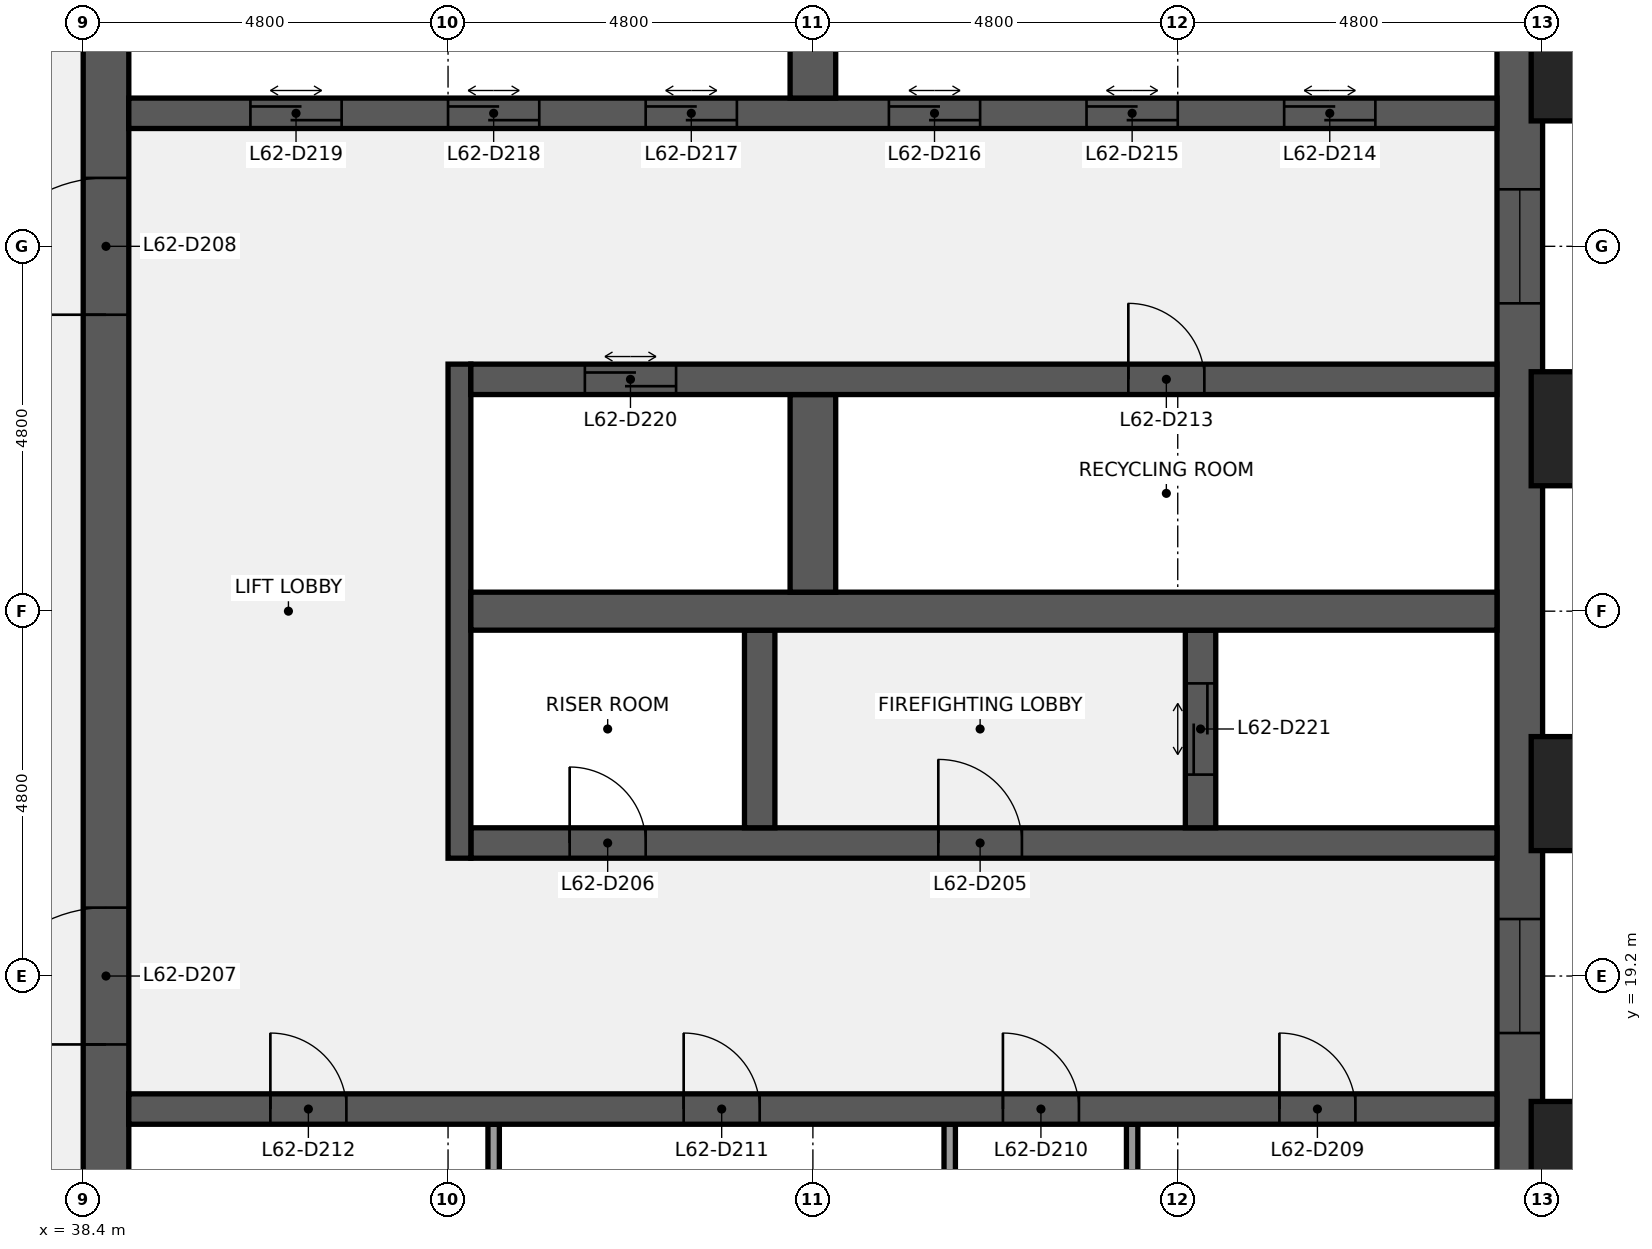
"""IFC4 building model, lengths in metres.
Left out: names, types, materials, properties, quantities, classifications, styles, units other than length and angle.
Written with IfcOpenShell. Run it as: python <this file> out.ifc"""

import sys

from ifc_helpers import new_model, si_unit, direction, frame, frame_2d, origin, origin_2d, place, context, subcontext, project, spatial, rectangle, extrude, element, fill, save


model = new_model("IFC4")
c1 = context("Model", 3, precision=1e-05, world=origin(), true_north=direction((0.0, 1.0)))
c2 = subcontext(c1, "Body", "Model", "MODEL_VIEW")
j1 = project(units=[si_unit("LENGTHUNIT", "METRE"), si_unit("PLANEANGLEUNIT", "RADIAN")], contexts=[c1])
p1 = place(None, origin())
s1 = spatial("IfcSite", under=j1, at=p1, CompositionType="ELEMENT")
p2 = place(p1, origin())
s2 = spatial("IfcBuilding", under=s1, at=p2, CompositionType="ELEMENT")
p3 = place(p2, frame((0.0, 0.0, 286.3)))
s3 = spatial("IfcBuildingStorey", under=s2, at=p3, CompositionType="ELEMENT", Elevation=286.3)
p4 = place(p3, frame((57.3, 38.4, 0.0), z_axis=(0.0, 0.0, 1.0), x_axis=(0.0, -1.0, 0.0)))
e1 = element("IfcWall", 1, at=p4, inside=s3, PredefinedType="SHEAR", context=c2, shape_type="SweptSolid", body=[
    extrude(rectangle(XDim=28.8, YDim=0.6, at=frame_2d((14.4, 0.0))), origin(), (0.0, 0.0, 1.0), 3.84),
])
p5 = place(p4, frame((18.45, 0.0, 0.9)))
e2 = element("IfcOpeningElement", 2, at=p5, cuts=e1, PredefinedType="OPENING", context=c2, shape_type="SweptSolid", body=[
    extrude(rectangle(XDim=1.5, YDim=1.5, at=frame_2d((0.75, 0.75))), frame((0.0, 0.31, 0.0), z_axis=(0.0, -1.0, 0.0), x_axis=(1.0, 0.0, 0.0)), (0.0, 0.0, 1.0), 0.62),
])
p6 = place(p4, frame((8.85, 0.0, 0.9)))
e3 = element("IfcOpeningElement", 3, at=p6, cuts=e1, PredefinedType="OPENING", context=c2, shape_type="SweptSolid", body=[
    extrude(rectangle(XDim=1.5, YDim=1.5, at=frame_2d((0.75, 0.75))), frame((0.0, 0.31, 0.0), z_axis=(0.0, -1.0, 0.0), x_axis=(1.0, 0.0, 0.0)), (0.0, 0.0, 1.0), 0.62),
])
p7 = place(p3, frame((38.7, 9.6, 0.0), z_axis=(0.0, 0.0, 1.0), x_axis=(0.0, 1.0, 0.0)))
e4 = element("IfcWall", 4, at=p7, inside=s3, PredefinedType="SHEAR", context=c2, shape_type="SweptSolid", body=[
    extrude(rectangle(XDim=28.8, YDim=0.6, at=frame_2d((14.4, 0.0))), origin(), (0.0, 0.0, 1.0), 3.84),
])
p8 = place(p7, frame((8.7, 0.0, 0.0)))
e5 = element("IfcOpeningElement", 5, at=p8, cuts=e4, PredefinedType="OPENING", context=c2, shape_type="SweptSolid", body=[
    extrude(rectangle(XDim=1.8, YDim=2.1, at=frame_2d((0.9, 1.05))), frame((0.0, 0.31, 0.0), z_axis=(0.0, -1.0, 0.0), x_axis=(1.0, 0.0, 0.0)), (0.0, 0.0, 1.0), 0.62),
])
p9 = place(p7, frame((18.3, 0.0, 0.0)))
e6 = element("IfcOpeningElement", 6, at=p9, cuts=e4, PredefinedType="OPENING", context=c2, shape_type="SweptSolid", body=[
    extrude(rectangle(XDim=1.8, YDim=2.1, at=frame_2d((0.9, 1.05))), frame((0.0, 0.31, 0.0), z_axis=(0.0, -1.0, 0.0), x_axis=(1.0, 0.0, 0.0)), (0.0, 0.0, 1.0), 0.62),
])
for number, where, z_axis, x_axis in (
    (7, (52.2, 14.65, 0.0), (0.0, 0.0, 1.0), (0.0, 1.0, 0.0)),
    (8, (49.8, 14.65, 0.0), (0.0, 0.0, 1.0), (0.0, 1.0, 0.0)),
    (9, (43.8, 14.65, 0.0), (0.0, 0.0, 1.0), (0.0, 1.0, 0.0)),
):
    element("IfcWall", number, at=place(p3, frame(where, z_axis=z_axis, x_axis=x_axis)), inside=s3, PredefinedType="PARTITIONING", context=c2, shape_type="SweptSolid", body=[
        extrude(rectangle(XDim=2.6, YDim=0.15, at=frame_2d((1.3, 0.0))), origin(), (0.0, 0.0, 1.0), 3.84),
    ])
p10 = place(p3, frame((39.0, 17.45, 0.0), z_axis=(0.0, 0.0, 1.0), x_axis=(1.0, 0.0, 0.0)))
e10 = element("IfcWall", 10, at=p10, inside=s3, PredefinedType="SHEAR", context=c2, shape_type="SweptSolid", body=[
    extrude(rectangle(XDim=18.0, YDim=0.4, at=frame_2d((9.0, 0.0))), origin(), (0.0, 0.0, 1.0), 3.84),
])
p11 = place(p10, frame((15.137, 0.0, 0.0)))
e11 = element("IfcOpeningElement", 11, at=p11, cuts=e10, PredefinedType="OPENING", context=c2, shape_type="SweptSolid", body=[
    extrude(rectangle(XDim=1.0, YDim=2.1, at=frame_2d((0.5, 1.05))), frame((0.0, 0.21, 0.0), z_axis=(0.0, -1.0, 0.0), x_axis=(1.0, 0.0, 0.0)), (0.0, 0.0, 1.0), 0.42),
])
p12 = place(p10, frame((11.5, 0.0, 0.0)))
e12 = element("IfcOpeningElement", 12, at=p12, cuts=e10, PredefinedType="OPENING", context=c2, shape_type="SweptSolid", body=[
    extrude(rectangle(XDim=1.0, YDim=2.1, at=frame_2d((0.5, 1.05))), frame((0.0, 0.21, 0.0), z_axis=(0.0, -1.0, 0.0), x_axis=(1.0, 0.0, 0.0)), (0.0, 0.0, 1.0), 0.42),
])
p13 = place(p10, frame((7.3, 0.0, 0.0)))
e13 = element("IfcOpeningElement", 13, at=p13, cuts=e10, PredefinedType="OPENING", context=c2, shape_type="SweptSolid", body=[
    extrude(rectangle(XDim=1.0, YDim=2.1, at=frame_2d((0.5, 1.05))), frame((0.0, 0.21, 0.0), z_axis=(0.0, -1.0, 0.0), x_axis=(1.0, 0.0, 0.0)), (0.0, 0.0, 1.0), 0.42),
])
p14 = place(p10, frame((1.863, 0.0, 0.0)))
e14 = element("IfcOpeningElement", 14, at=p14, cuts=e10, PredefinedType="OPENING", context=c2, shape_type="SweptSolid", body=[
    extrude(rectangle(XDim=1.0, YDim=2.1, at=frame_2d((0.5, 1.05))), frame((0.0, 0.21, 0.0), z_axis=(0.0, -1.0, 0.0), x_axis=(1.0, 0.0, 0.0)), (0.0, 0.0, 1.0), 0.42),
])
p15 = place(p3, frame((43.5, 20.95, 0.0), z_axis=(0.0, 0.0, 1.0), x_axis=(1.0, 0.0, 0.0)))
e15 = element("IfcWall", 15, at=p15, inside=s3, PredefinedType="SHEAR", context=c2, shape_type="SweptSolid", body=[
    extrude(rectangle(XDim=13.5, YDim=0.4, at=frame_2d((6.75, 0.0))), origin(), (0.0, 0.0, 1.0), 3.84),
])
p16 = place(p15, frame((6.15, 0.0, 0.0)))
e16 = element("IfcOpeningElement", 16, at=p16, cuts=e15, PredefinedType="OPENING", context=c2, shape_type="SweptSolid", body=[
    extrude(rectangle(XDim=1.1, YDim=2.1, at=frame_2d((0.55, 1.05))), frame((0.0, 0.21, 0.0), z_axis=(0.0, -1.0, 0.0), x_axis=(1.0, 0.0, 0.0)), (0.0, 0.0, 1.0), 0.42),
])
p17 = place(p15, frame((1.3, 0.0, 0.0)))
e17 = element("IfcOpeningElement", 17, at=p17, cuts=e15, PredefinedType="OPENING", context=c2, shape_type="SweptSolid", body=[
    extrude(rectangle(XDim=1.0, YDim=2.1, at=frame_2d((0.5, 1.05))), frame((0.0, 0.21, 0.0), z_axis=(0.0, -1.0, 0.0), x_axis=(1.0, 0.0, 0.0)), (0.0, 0.0, 1.0), 0.42),
])
p18 = place(p3, frame((43.35, 20.75, 0.0), z_axis=(0.0, 0.0, 1.0), x_axis=(0.0, 1.0, 0.0)))
e18 = element("IfcWall", 18, at=p18, inside=s3, PredefinedType="SHEAR", context=c2, shape_type="SweptSolid", body=[
    extrude(rectangle(XDim=6.5, YDim=0.3, at=frame_2d((3.25, 0.0))), origin(), (0.0, 0.0, 1.0), 3.84),
])
p19 = place(p3, frame((53.1, 21.15, 0.0), z_axis=(0.0, 0.0, 1.0), x_axis=(0.0, 1.0, 0.0)))
e19 = element("IfcWall", 19, at=p19, inside=s3, PredefinedType="SHEAR", context=c2, shape_type="SweptSolid", body=[
    extrude(rectangle(XDim=2.6, YDim=0.4, at=frame_2d((1.3, 0.0))), origin(), (0.0, 0.0, 1.0), 3.84),
])
p20 = place(p19, frame((0.7, 0.0, 0.0)))
e20 = element("IfcOpeningElement", 20, at=p20, cuts=e19, PredefinedType="OPENING", context=c2, shape_type="SweptSolid", body=[
    extrude(rectangle(XDim=1.2, YDim=2.1, at=frame_2d((0.6, 1.05))), frame((0.0, 0.21, 0.0), z_axis=(0.0, -1.0, 0.0), x_axis=(1.0, 0.0, 0.0)), (0.0, 0.0, 1.0), 0.42),
])
p21 = place(p3, frame((47.3, 21.15, 0.0), z_axis=(0.0, 0.0, 1.0), x_axis=(0.0, 1.0, 0.0)))
e21 = element("IfcWall", 21, at=p21, inside=s3, PredefinedType="SHEAR", context=c2, shape_type="SweptSolid", body=[
    extrude(rectangle(XDim=2.6, YDim=0.4, at=frame_2d((1.3, 0.0))), origin(), (0.0, 0.0, 1.0), 3.84),
])
p22 = place(p3, frame((43.5, 24.0, 0.0), z_axis=(0.0, 0.0, 1.0), x_axis=(1.0, 0.0, 0.0)))
e22 = element("IfcWall", 22, at=p22, inside=s3, PredefinedType="SHEAR", context=c2, shape_type="SweptSolid", body=[
    extrude(rectangle(XDim=13.5, YDim=0.5, at=frame_2d((6.75, 0.0))), origin(), (0.0, 0.0, 1.0), 3.84),
])
p23 = place(p3, frame((48.0, 24.25, 0.0), z_axis=(0.0, 0.0, 1.0), x_axis=(0.0, 1.0, 0.0)))
e23 = element("IfcWall", 23, at=p23, inside=s3, PredefinedType="SHEAR", context=c2, shape_type="SweptSolid", body=[
    extrude(rectangle(XDim=2.6, YDim=0.6, at=frame_2d((1.3, 0.0))), origin(), (0.0, 0.0, 1.0), 3.84),
])
p24 = place(p3, frame((43.5, 27.05, 0.0), z_axis=(0.0, 0.0, 1.0), x_axis=(1.0, 0.0, 0.0)))
e24 = element("IfcWall", 24, at=p24, inside=s3, PredefinedType="SHEAR", context=c2, shape_type="SweptSolid", body=[
    extrude(rectangle(XDim=13.5, YDim=0.4, at=frame_2d((6.75, 0.0))), origin(), (0.0, 0.0, 1.0), 3.84),
])
p25 = place(p24, frame((8.65, 0.0, 0.0)))
e25 = element("IfcOpeningElement", 25, at=p25, cuts=e24, PredefinedType="OPENING", context=c2, shape_type="SweptSolid", body=[
    extrude(rectangle(XDim=1.0, YDim=2.1, at=frame_2d((0.5, 1.05))), frame((0.0, 0.21, 0.0), z_axis=(0.0, -1.0, 0.0), x_axis=(1.0, 0.0, 0.0)), (0.0, 0.0, 1.0), 0.42),
])
p26 = place(p24, frame((1.5, 0.0, 0.0)))
e26 = element("IfcOpeningElement", 26, at=p26, cuts=e24, PredefinedType="OPENING", context=c2, shape_type="SweptSolid", body=[
    extrude(rectangle(XDim=1.2, YDim=2.1, at=frame_2d((0.6, 1.05))), frame((0.0, 0.21, 0.0), z_axis=(0.0, -1.0, 0.0), x_axis=(1.0, 0.0, 0.0)), (0.0, 0.0, 1.0), 0.42),
])
p27 = place(p3, frame((39.0, 30.55, 0.0), z_axis=(0.0, 0.0, 1.0), x_axis=(1.0, 0.0, 0.0)))
e27 = element("IfcWall", 27, at=p27, inside=s3, PredefinedType="SHEAR", context=c2, shape_type="SweptSolid", body=[
    extrude(rectangle(XDim=18.0, YDim=0.4, at=frame_2d((9.0, 0.0))), origin(), (0.0, 0.0, 1.0), 3.84),
])
p28 = place(p27, frame((15.2, 0.0, 0.0)))
e28 = element("IfcOpeningElement", 28, at=p28, cuts=e27, PredefinedType="OPENING", context=c2, shape_type="SweptSolid", body=[
    extrude(rectangle(XDim=1.2, YDim=2.1, at=frame_2d((0.6, 1.05))), frame((0.0, 0.21, 0.0), z_axis=(0.0, -1.0, 0.0), x_axis=(1.0, 0.0, 0.0)), (0.0, 0.0, 1.0), 0.42),
])
p29 = place(p27, frame((12.6, 0.0, 0.0)))
e29 = element("IfcOpeningElement", 29, at=p29, cuts=e27, PredefinedType="OPENING", context=c2, shape_type="SweptSolid", body=[
    extrude(rectangle(XDim=1.2, YDim=2.1, at=frame_2d((0.6, 1.05))), frame((0.0, 0.21, 0.0), z_axis=(0.0, -1.0, 0.0), x_axis=(1.0, 0.0, 0.0)), (0.0, 0.0, 1.0), 0.42),
])
p30 = place(p27, frame((10.0, 0.0, 0.0)))
e30 = element("IfcOpeningElement", 30, at=p30, cuts=e27, PredefinedType="OPENING", context=c2, shape_type="SweptSolid", body=[
    extrude(rectangle(XDim=1.2, YDim=2.1, at=frame_2d((0.6, 1.05))), frame((0.0, 0.21, 0.0), z_axis=(0.0, -1.0, 0.0), x_axis=(1.0, 0.0, 0.0)), (0.0, 0.0, 1.0), 0.42),
])
p31 = place(p27, frame((6.8, 0.0, 0.0)))
e31 = element("IfcOpeningElement", 31, at=p31, cuts=e27, PredefinedType="OPENING", context=c2, shape_type="SweptSolid", body=[
    extrude(rectangle(XDim=1.2, YDim=2.1, at=frame_2d((0.6, 1.05))), frame((0.0, 0.21, 0.0), z_axis=(0.0, -1.0, 0.0), x_axis=(1.0, 0.0, 0.0)), (0.0, 0.0, 1.0), 0.42),
])
p32 = place(p27, frame((4.2, 0.0, 0.0)))
e32 = element("IfcOpeningElement", 32, at=p32, cuts=e27, PredefinedType="OPENING", context=c2, shape_type="SweptSolid", body=[
    extrude(rectangle(XDim=1.2, YDim=2.1, at=frame_2d((0.6, 1.05))), frame((0.0, 0.21, 0.0), z_axis=(0.0, -1.0, 0.0), x_axis=(1.0, 0.0, 0.0)), (0.0, 0.0, 1.0), 0.42),
])
p33 = place(p27, frame((1.6, 0.0, 0.0)))
e33 = element("IfcOpeningElement", 33, at=p33, cuts=e27, PredefinedType="OPENING", context=c2, shape_type="SweptSolid", body=[
    extrude(rectangle(XDim=1.2, YDim=2.1, at=frame_2d((0.6, 1.05))), frame((0.0, 0.21, 0.0), z_axis=(0.0, -1.0, 0.0), x_axis=(1.0, 0.0, 0.0)), (0.0, 0.0, 1.0), 0.42),
])
p34 = place(p3, frame((48.0, 30.75, 0.0), z_axis=(0.0, 0.0, 1.0), x_axis=(0.0, 1.0, 0.0)))
e34 = element("IfcWall", 34, at=p34, inside=s3, PredefinedType="SHEAR", context=c2, shape_type="SweptSolid", body=[
    extrude(rectangle(XDim=2.6, YDim=0.6, at=frame_2d((1.3, 0.0))), origin(), (0.0, 0.0, 1.0), 3.84),
])
for number, where, z_axis, x_axis in (
    (35, (58.35, 16.8, 0.0), (0.0, 0.0, 1.0), (0.0, 1.0, 0.0)),
    (36, (58.35, 21.6, 0.0), (0.0, 0.0, 1.0), (0.0, 1.0, 0.0)),
    (37, (58.35, 26.4, 0.0), (0.0, 0.0, 1.0), (0.0, 1.0, 0.0)),
    (38, (58.35, 31.2, 0.0), (0.0, 0.0, 1.0), (0.0, 1.0, 0.0)),
):
    element("IfcColumn", number, at=place(p3, frame(where, z_axis=z_axis, x_axis=x_axis)), inside=s3, PredefinedType="PILASTER", context=c2, shape_type="SweptSolid", body=[
        extrude(rectangle(XDim=1.8, YDim=1.5, at=origin_2d()), origin(), (0.0, 0.0, 1.0), 4.0),
    ])
p35 = place(p16, origin())
e39 = element("IfcDoor", 39, at=p35, inside=s3, OperationType="SINGLE_SWING_LEFT", PredefinedType="DOOR", context=c2, shape_type="SweptSolid", body=[
    extrude(rectangle(XDim=1.1, YDim=2.1, at=frame_2d((0.55, 1.05))), frame((0.0, 0.025, 0.0), z_axis=(0.0, -1.0, 0.0), x_axis=(1.0, 0.0, 0.0)), (0.0, 0.0, 1.0), 0.05),
])
fill(e16, e39)
p36 = place(p17, origin())
e40 = element("IfcDoor", 40, at=p36, inside=s3, OperationType="SINGLE_SWING_LEFT", PredefinedType="DOOR", context=c2, shape_type="SweptSolid", body=[
    extrude(rectangle(XDim=1.0, YDim=2.1, at=frame_2d((0.5, 1.05))), frame((0.0, 0.025, 0.0), z_axis=(0.0, -1.0, 0.0), x_axis=(1.0, 0.0, 0.0)), (0.0, 0.0, 1.0), 0.05),
])
fill(e17, e40)
p37 = place(p8, origin())
e41 = element("IfcDoor", 41, at=p37, inside=s3, OperationType="DOUBLE_DOOR_SINGLE_SWING", PredefinedType="DOOR", context=c2, shape_type="SweptSolid", body=[
    extrude(rectangle(XDim=1.8, YDim=2.1, at=frame_2d((0.9, 1.05))), frame((0.0, 0.025, 0.0), z_axis=(0.0, -1.0, 0.0), x_axis=(1.0, 0.0, 0.0)), (0.0, 0.0, 1.0), 0.05),
])
fill(e5, e41)
p38 = place(p9, origin())
e42 = element("IfcDoor", 42, at=p38, inside=s3, OperationType="DOUBLE_DOOR_SINGLE_SWING", PredefinedType="DOOR", context=c2, shape_type="SweptSolid", body=[
    extrude(rectangle(XDim=1.8, YDim=2.1, at=frame_2d((0.9, 1.05))), frame((0.0, 0.025, 0.0), z_axis=(0.0, -1.0, 0.0), x_axis=(1.0, 0.0, 0.0)), (0.0, 0.0, 1.0), 0.05),
])
fill(e6, e42)
p39 = place(p11, origin())
e43 = element("IfcDoor", 43, at=p39, inside=s3, OperationType="SINGLE_SWING_LEFT", PredefinedType="DOOR", context=c2, shape_type="SweptSolid", body=[
    extrude(rectangle(XDim=1.0, YDim=2.1, at=frame_2d((0.5, 1.05))), frame((0.0, 0.025, 0.0), z_axis=(0.0, -1.0, 0.0), x_axis=(1.0, 0.0, 0.0)), (0.0, 0.0, 1.0), 0.05),
])
fill(e11, e43)
p40 = place(p12, origin())
e44 = element("IfcDoor", 44, at=p40, inside=s3, OperationType="SINGLE_SWING_LEFT", PredefinedType="DOOR", context=c2, shape_type="SweptSolid", body=[
    extrude(rectangle(XDim=1.0, YDim=2.1, at=frame_2d((0.5, 1.05))), frame((0.0, 0.025, 0.0), z_axis=(0.0, -1.0, 0.0), x_axis=(1.0, 0.0, 0.0)), (0.0, 0.0, 1.0), 0.05),
])
fill(e12, e44)
p41 = place(p13, origin())
e45 = element("IfcDoor", 45, at=p41, inside=s3, OperationType="SINGLE_SWING_LEFT", PredefinedType="DOOR", context=c2, shape_type="SweptSolid", body=[
    extrude(rectangle(XDim=1.0, YDim=2.1, at=frame_2d((0.5, 1.05))), frame((0.0, 0.025, 0.0), z_axis=(0.0, -1.0, 0.0), x_axis=(1.0, 0.0, 0.0)), (0.0, 0.0, 1.0), 0.05),
])
fill(e13, e45)
p42 = place(p14, origin())
e46 = element("IfcDoor", 46, at=p42, inside=s3, OperationType="SINGLE_SWING_LEFT", PredefinedType="DOOR", context=c2, shape_type="SweptSolid", body=[
    extrude(rectangle(XDim=1.0, YDim=2.1, at=frame_2d((0.5, 1.05))), frame((0.0, 0.025, 0.0), z_axis=(0.0, -1.0, 0.0), x_axis=(1.0, 0.0, 0.0)), (0.0, 0.0, 1.0), 0.05),
])
fill(e14, e46)
p43 = place(p25, origin())
e47 = element("IfcDoor", 47, at=p43, inside=s3, OperationType="SINGLE_SWING_LEFT", PredefinedType="DOOR", context=c2, shape_type="SweptSolid", body=[
    extrude(rectangle(XDim=1.0, YDim=2.1, at=frame_2d((0.5, 1.05))), frame((0.0, 0.025, 0.0), z_axis=(0.0, -1.0, 0.0), x_axis=(1.0, 0.0, 0.0)), (0.0, 0.0, 1.0), 0.05),
])
fill(e25, e47)
p44 = place(p28, origin())
e48 = element("IfcDoor", 48, at=p44, inside=s3, OperationType="DOUBLE_DOOR_SLIDING", PredefinedType="DOOR", context=c2, shape_type="SweptSolid", body=[
    extrude(rectangle(XDim=1.2, YDim=2.1, at=frame_2d((0.6, 1.05))), frame((0.0, 0.025, 0.0), z_axis=(0.0, -1.0, 0.0), x_axis=(1.0, 0.0, 0.0)), (0.0, 0.0, 1.0), 0.05),
])
fill(e28, e48)
p45 = place(p29, origin())
e49 = element("IfcDoor", 49, at=p45, inside=s3, OperationType="DOUBLE_DOOR_SLIDING", PredefinedType="DOOR", context=c2, shape_type="SweptSolid", body=[
    extrude(rectangle(XDim=1.2, YDim=2.1, at=frame_2d((0.6, 1.05))), frame((0.0, 0.025, 0.0), z_axis=(0.0, -1.0, 0.0), x_axis=(1.0, 0.0, 0.0)), (0.0, 0.0, 1.0), 0.05),
])
fill(e29, e49)
p46 = place(p30, origin())
e50 = element("IfcDoor", 50, at=p46, inside=s3, OperationType="DOUBLE_DOOR_SLIDING", PredefinedType="DOOR", context=c2, shape_type="SweptSolid", body=[
    extrude(rectangle(XDim=1.2, YDim=2.1, at=frame_2d((0.6, 1.05))), frame((0.0, 0.025, 0.0), z_axis=(0.0, -1.0, 0.0), x_axis=(1.0, 0.0, 0.0)), (0.0, 0.0, 1.0), 0.05),
])
fill(e30, e50)
p47 = place(p31, origin())
e51 = element("IfcDoor", 51, at=p47, inside=s3, OperationType="DOUBLE_DOOR_SLIDING", PredefinedType="DOOR", context=c2, shape_type="SweptSolid", body=[
    extrude(rectangle(XDim=1.2, YDim=2.1, at=frame_2d((0.6, 1.05))), frame((0.0, 0.025, 0.0), z_axis=(0.0, -1.0, 0.0), x_axis=(1.0, 0.0, 0.0)), (0.0, 0.0, 1.0), 0.05),
])
fill(e31, e51)
p48 = place(p32, origin())
e52 = element("IfcDoor", 52, at=p48, inside=s3, OperationType="DOUBLE_DOOR_SLIDING", PredefinedType="DOOR", context=c2, shape_type="SweptSolid", body=[
    extrude(rectangle(XDim=1.2, YDim=2.1, at=frame_2d((0.6, 1.05))), frame((0.0, 0.025, 0.0), z_axis=(0.0, -1.0, 0.0), x_axis=(1.0, 0.0, 0.0)), (0.0, 0.0, 1.0), 0.05),
])
fill(e32, e52)
p49 = place(p33, origin())
e53 = element("IfcDoor", 53, at=p49, inside=s3, OperationType="DOUBLE_DOOR_SLIDING", PredefinedType="DOOR", context=c2, shape_type="SweptSolid", body=[
    extrude(rectangle(XDim=1.2, YDim=2.1, at=frame_2d((0.6, 1.05))), frame((0.0, 0.025, 0.0), z_axis=(0.0, -1.0, 0.0), x_axis=(1.0, 0.0, 0.0)), (0.0, 0.0, 1.0), 0.05),
])
fill(e33, e53)
p50 = place(p26, origin())
e54 = element("IfcDoor", 54, at=p50, inside=s3, OperationType="DOUBLE_DOOR_SLIDING", PredefinedType="DOOR", context=c2, shape_type="SweptSolid", body=[
    extrude(rectangle(XDim=1.2, YDim=2.1, at=frame_2d((0.6, 1.05))), frame((0.0, 0.025, 0.0), z_axis=(0.0, -1.0, 0.0), x_axis=(1.0, 0.0, 0.0)), (0.0, 0.0, 1.0), 0.05),
])
fill(e26, e54)
p51 = place(p20, origin())
e55 = element("IfcDoor", 55, at=p51, inside=s3, OperationType="DOUBLE_DOOR_SLIDING", PredefinedType="DOOR", context=c2, shape_type="SweptSolid", body=[
    extrude(rectangle(XDim=1.2, YDim=2.1, at=frame_2d((0.6, 1.05))), frame((0.0, 0.025, 0.0), z_axis=(0.0, -1.0, 0.0), x_axis=(1.0, 0.0, 0.0)), (0.0, 0.0, 1.0), 0.05),
])
fill(e20, e55)
p52 = place(p5, origin())
e56 = element("IfcWindow", 56, at=p52, inside=s3, PartitioningType="SINGLE_PANEL", PredefinedType="WINDOW", context=c2, shape_type="SweptSolid", body=[
    extrude(rectangle(XDim=1.5, YDim=1.5, at=frame_2d((0.75, 0.75))), frame((0.0, 0.03, 0.0), z_axis=(0.0, -1.0, 0.0), x_axis=(1.0, 0.0, 0.0)), (0.0, 0.0, 1.0), 0.06),
])
fill(e2, e56)
p53 = place(p6, origin())
e57 = element("IfcWindow", 57, at=p53, inside=s3, PartitioningType="SINGLE_PANEL", PredefinedType="WINDOW", context=c2, shape_type="SweptSolid", body=[
    extrude(rectangle(XDim=1.5, YDim=1.5, at=frame_2d((0.75, 0.75))), frame((0.0, 0.03, 0.0), z_axis=(0.0, -1.0, 0.0), x_axis=(1.0, 0.0, 0.0)), (0.0, 0.0, 1.0), 0.06),
])
fill(e3, e57)
save(model, sys.argv[1])
